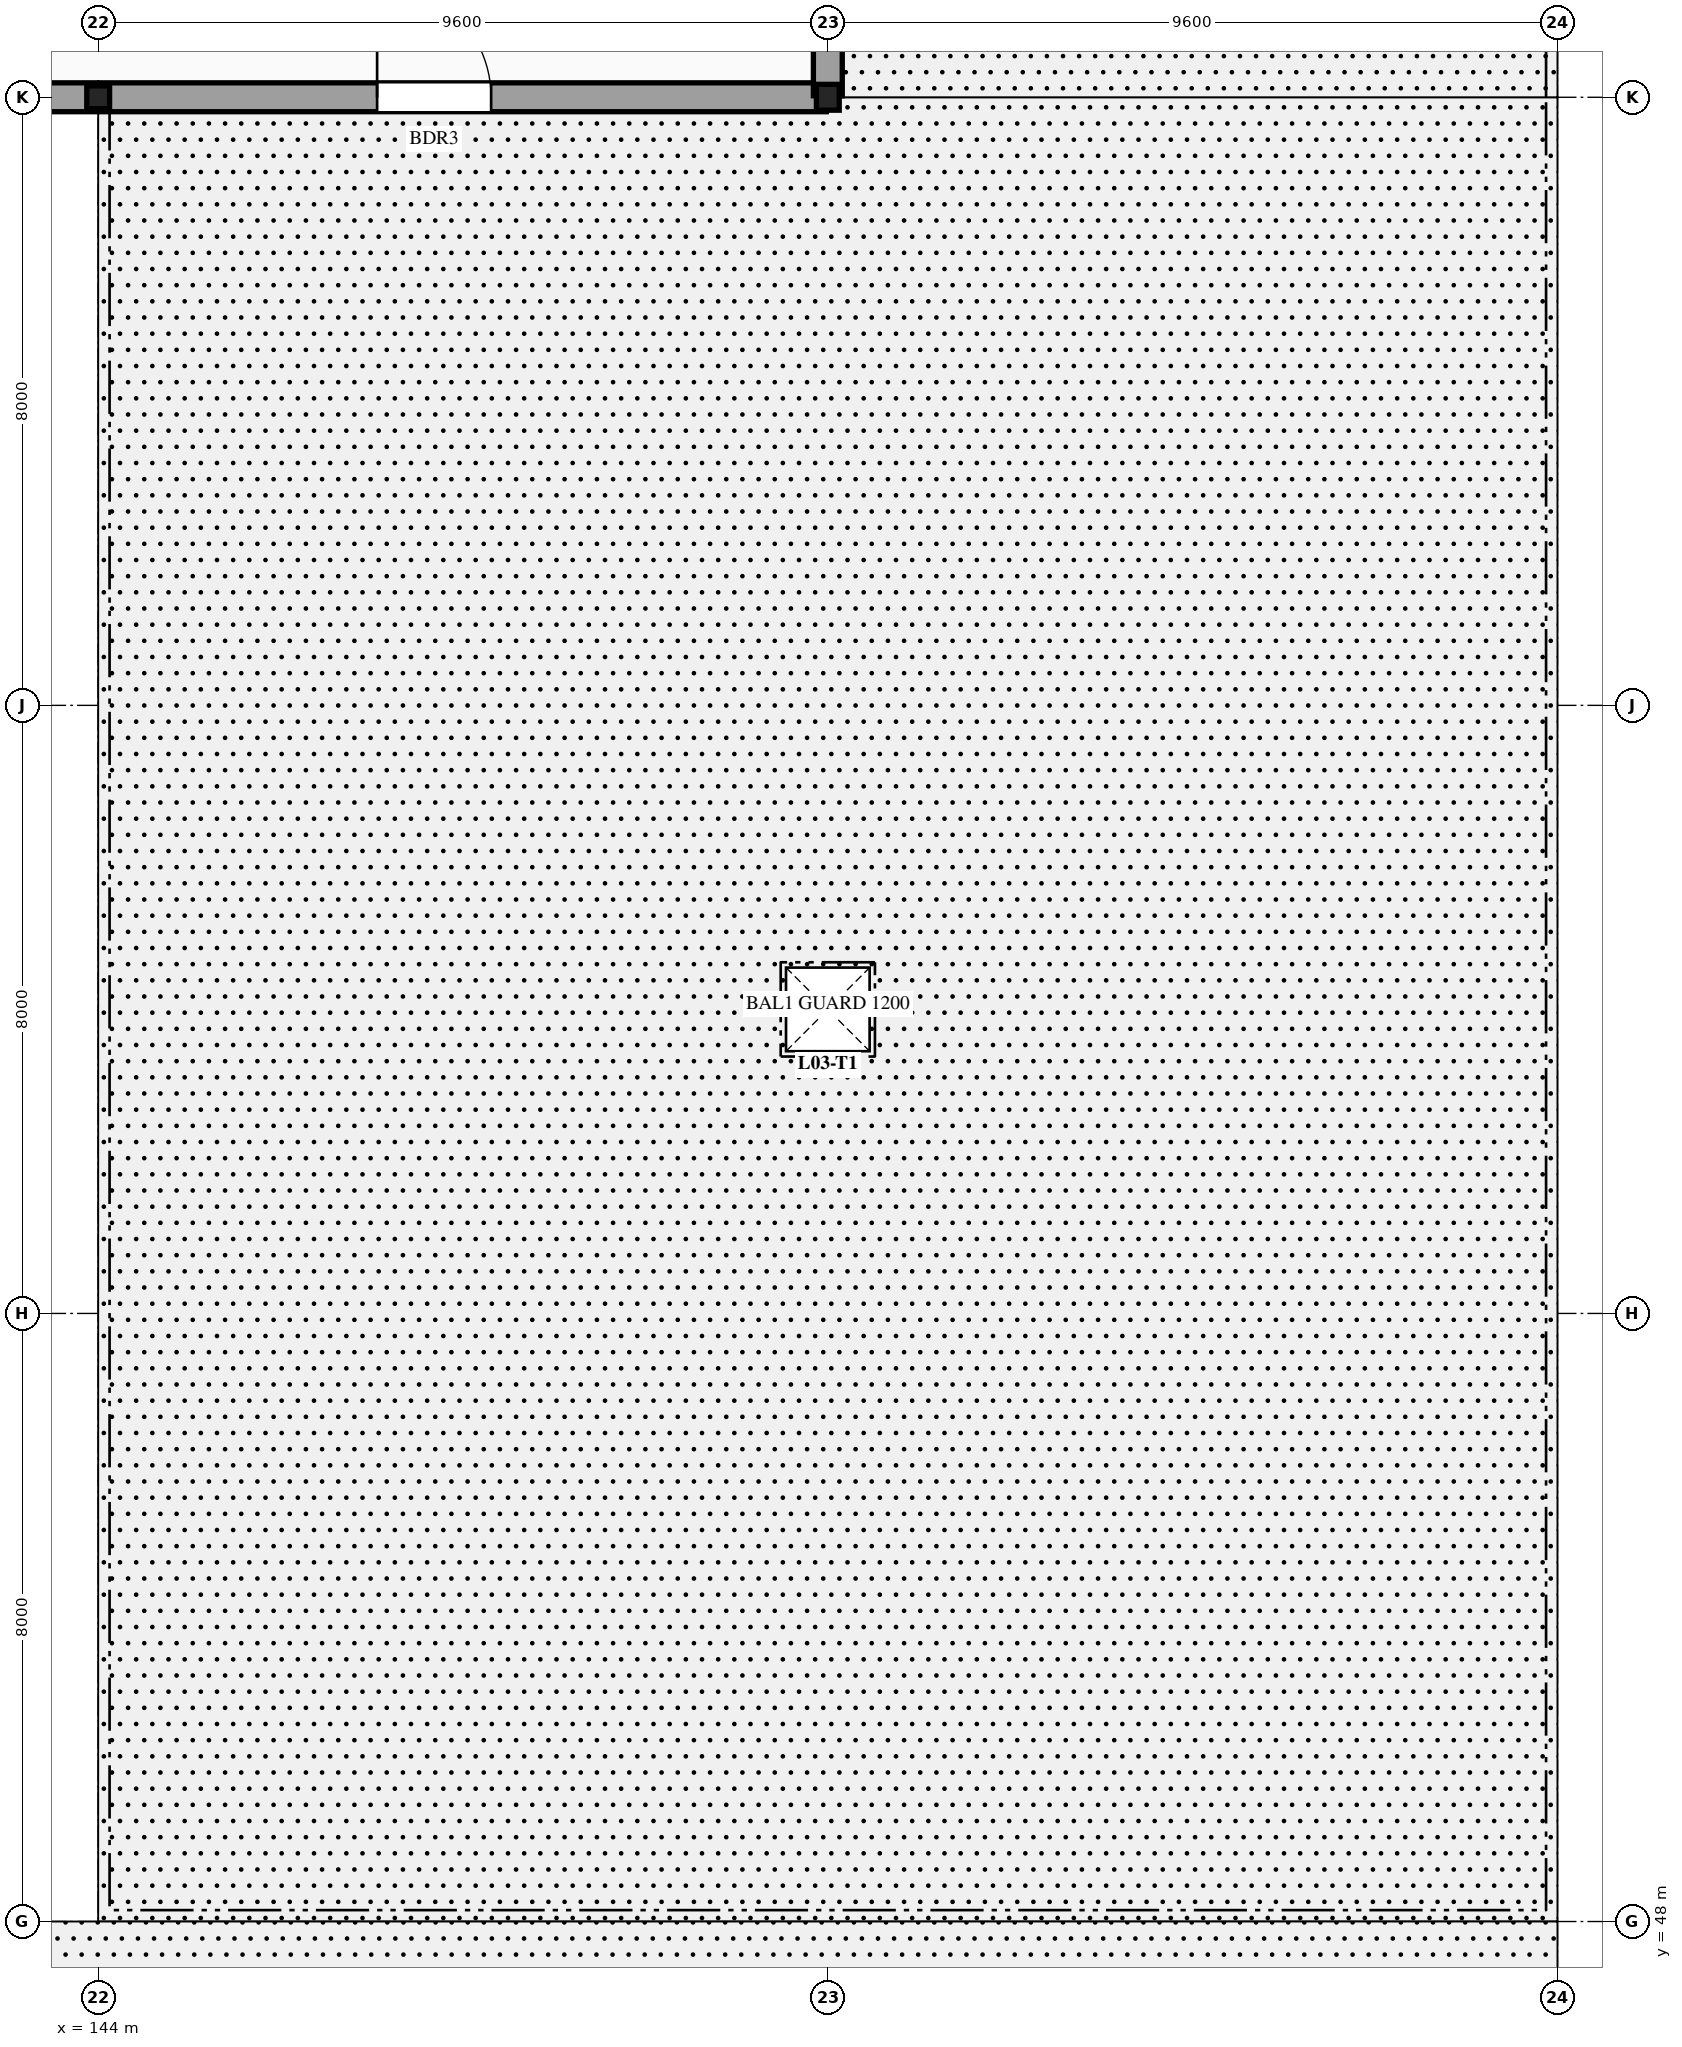
"""IFC4 building model, lengths in metres.
Left out: names, types, materials, properties, quantities, classifications, styles, units other than length and angle.
Written with IfcOpenShell. Run it as: python <this file> out.ifc"""

import sys

from ifc_helpers import new_model, si_unit, direction, frame, frame_2d, origin, origin_2d, place, context, subcontext, project, spatial, rectangle, i_section, extrude, element, fill, save


model = new_model("IFC4")
c1 = context("Model", 3, precision=1e-05, world=origin(), true_north=direction((0.0, 1.0)))
c2 = subcontext(c1, "Body", "Model", "MODEL_VIEW")
j1 = project(units=[si_unit("LENGTHUNIT", "METRE"), si_unit("PLANEANGLEUNIT", "RADIAN")], contexts=[c1])
p1 = place(None, origin())
s1 = spatial("IfcSite", under=j1, at=p1, CompositionType="ELEMENT")
p2 = place(p1, origin())
s2 = spatial("IfcBuilding", under=s1, at=p2, CompositionType="ELEMENT")
p3 = place(p2, frame((0.0, 0.0, 12.9)))
s3 = spatial("IfcBuildingStorey", under=s2, at=p3, CompositionType="ELEMENT", Elevation=12.9)
p4 = place(p3, frame((144.0, 72.0, -0.26), z_axis=(0.0, 0.0, 1.0), x_axis=(1.0, 0.0, 0.0)))
e1 = element("IfcColumn", 1, at=p4, inside=s3, PredefinedType="COLUMN", context=c2, shape_type="SweptSolid", body=[
    extrude(i_section(OverallWidth=0.3, OverallDepth=0.3, WebThickness=0.011, FlangeThickness=0.019, FilletRadius=0.027, at=origin_2d()), origin(), (0.0, 0.0, 1.0), 4.48),
])
p5 = place(p3, frame((153.6, 72.0, -0.26), z_axis=(0.0, 0.0, 1.0), x_axis=(1.0, 0.0, 0.0)))
e2 = element("IfcColumn", 2, at=p5, inside=s3, PredefinedType="COLUMN", context=c2, shape_type="SweptSolid", body=[
    extrude(i_section(OverallWidth=0.3, OverallDepth=0.34, WebThickness=0.012, FlangeThickness=0.021, FilletRadius=0.027, at=origin_2d()), origin(), (0.0, 0.0, 1.0), 4.48),
])
p6 = place(p3, frame((134.42, 72.0, 0.0), z_axis=(0.0, 0.0, 1.0), x_axis=(1.0, 0.0, 0.0)))
e3 = element("IfcWall", 3, at=p6, inside=s3, PredefinedType="SOLIDWALL", context=c2, shape_type="SweptSolid", body=[
    extrude(rectangle(XDim=9.56, YDim=0.38, at=frame_2d((4.78, 0.0))), origin(), (0.0, 0.0, 1.0), 3.54),
])
p7 = place(p6, frame((0.85, 0.0, 0.85)))
e4 = element("IfcOpeningElement", 4, at=p7, cuts=e3, PredefinedType="OPENING", context=c2, shape_type="SweptSolid", body=[
    extrude(rectangle(XDim=1.2, YDim=1.8, at=frame_2d((0.6, 0.9))), frame((0.0, 0.2, 0.0), z_axis=(0.0, -1.0, 0.0), x_axis=(1.0, 0.0, 0.0)), (0.0, 0.0, 1.0), 0.4),
])
p8 = place(p6, frame((5.95, 0.0, 0.85)))
e5 = element("IfcOpeningElement", 5, at=p8, cuts=e3, PredefinedType="OPENING", context=c2, shape_type="SweptSolid", body=[
    extrude(rectangle(XDim=1.2, YDim=1.8, at=frame_2d((0.6, 0.9))), frame((0.0, 0.2, 0.0), z_axis=(0.0, -1.0, 0.0), x_axis=(1.0, 0.0, 0.0)), (0.0, 0.0, 1.0), 0.4),
])
p9 = place(p3, frame((144.02, 72.0, 0.0), z_axis=(0.0, 0.0, 1.0), x_axis=(1.0, 0.0, 0.0)))
e6 = element("IfcWall", 6, at=p9, inside=s3, PredefinedType="SOLIDWALL", context=c2, shape_type="SweptSolid", body=[
    extrude(rectangle(XDim=9.56, YDim=0.38, at=frame_2d((4.78, 0.0))), origin(), (0.0, 0.0, 1.0), 3.54),
])
p10 = place(p9, frame((3.65, 0.0, 0.0)))
e7 = element("IfcOpeningElement", 7, at=p10, cuts=e6, PredefinedType="OPENING", context=c2, shape_type="SweptSolid", body=[
    extrude(rectangle(XDim=1.5, YDim=2.2, at=frame_2d((0.75, 1.1))), frame((0.0, 0.2, 0.0), z_axis=(0.0, -1.0, 0.0), x_axis=(1.0, 0.0, 0.0)), (0.0, 0.0, 1.0), 0.4),
])
p11 = place(p3, frame((153.6, 72.02, 0.0), z_axis=(0.0, 0.0, 1.0), x_axis=(0.0, 1.0, 0.0)))
e8 = element("IfcWall", 8, at=p11, inside=s3, PredefinedType="SOLIDWALL", context=c2, shape_type="SweptSolid", body=[
    extrude(rectangle(XDim=7.96, YDim=0.38, at=frame_2d((3.98, 0.0))), origin(), (0.0, 0.0, 1.0), 3.54),
])
p12 = place(p11, frame((2.8, 0.0, 0.0)))
e9 = element("IfcOpeningElement", 9, at=p12, cuts=e8, PredefinedType="OPENING", context=c2, shape_type="SweptSolid", body=[
    extrude(rectangle(XDim=1.35, YDim=2.2, at=frame_2d((0.675, 1.1))), frame((0.0, 0.2, 0.0), z_axis=(0.0, -1.0, 0.0), x_axis=(1.0, 0.0, 0.0)), (0.0, 0.0, 1.0), 0.4),
])
p13 = place(p10, origin())
e10 = element("IfcDoor", 10, at=p13, inside=s3, OperationType="SINGLE_SWING_LEFT", PredefinedType="DOOR", context=c2, shape_type="SweptSolid", body=[
    extrude(rectangle(XDim=1.5, YDim=2.2, at=frame_2d((0.75, 1.1))), frame((0.0, 0.025, 0.0), z_axis=(0.0, -1.0, 0.0), x_axis=(1.0, 0.0, 0.0)), (0.0, 0.0, 1.0), 0.05),
])
fill(e7, e10)
save(model, sys.argv[1])
